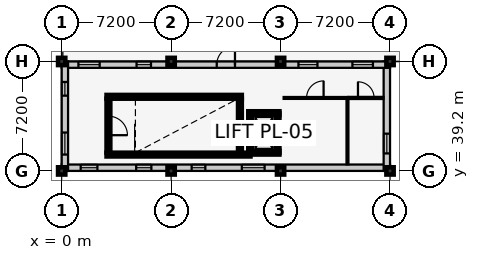
"""IFC4 building model, lengths in metres.
Left out: names, types, materials, properties, quantities, classifications, styles, units other than length and angle.
Written with IfcOpenShell. Run it as: python <this file> out.ifc"""

import sys

from ifc_helpers import new_model, si_unit, direction, frame, frame_2d, origin, origin_2d, place, context, subcontext, project, spatial, rectangle, extrude, element, fill, save


model = new_model("IFC4")
c1 = context("Model", 3, precision=1e-05, world=origin(), true_north=direction((0.0, 1.0)))
c2 = subcontext(c1, "Body", "Model", "MODEL_VIEW")
j1 = project(units=[si_unit("LENGTHUNIT", "METRE"), si_unit("PLANEANGLEUNIT", "RADIAN")], contexts=[c1])
p1 = place(None, origin())
s1 = spatial("IfcSite", under=j1, at=p1, CompositionType="ELEMENT")
p2 = place(p1, origin())
s2 = spatial("IfcBuilding", under=s1, at=p2, CompositionType="ELEMENT")
p3 = place(p2, frame((0.0, 0.0, 18.0)))
s3 = spatial("IfcBuildingStorey", under=s2, at=p3, CompositionType="ELEMENT", Elevation=18.0)
for number, where, z_axis, x_axis in (
    (1, (0.0, 39.2, 0.0), (0.0, 0.0, 1.0), (1.0, 0.0, 0.0)),
    (2, (0.0, 46.4, 0.0), (0.0, 0.0, 1.0), (1.0, 0.0, 0.0)),
    (3, (7.2, 39.2, 0.0), (0.0, 0.0, 1.0), (1.0, 0.0, 0.0)),
    (4, (7.2, 46.4, 0.0), (0.0, 0.0, 1.0), (1.0, 0.0, 0.0)),
    (5, (14.4, 39.2, 0.0), (0.0, 0.0, 1.0), (1.0, 0.0, 0.0)),
    (6, (14.4, 46.4, 0.0), (0.0, 0.0, 1.0), (1.0, 0.0, 0.0)),
    (7, (21.6, 39.2, 0.0), (0.0, 0.0, 1.0), (1.0, 0.0, 0.0)),
    (8, (21.6, 46.4, 0.0), (0.0, 0.0, 1.0), (1.0, 0.0, 0.0)),
):
    element("IfcColumn", number, at=place(p3, frame(where, z_axis=z_axis, x_axis=x_axis)), inside=s3, PredefinedType="COLUMN", context=c2, shape_type="SweptSolid", body=[
        extrude(rectangle(XDim=0.48, YDim=0.48, at=origin_2d()), origin(), (0.0, 0.0, 1.0), 3.9),
    ])
p4 = place(p3, frame((21.6, 39.41, 0.0), z_axis=(0.0, 0.0, 1.0), x_axis=(-1.0, 0.0, 0.0)))
e9 = element("IfcWall", 9, at=p4, inside=s3, PredefinedType="SOLIDWALL", context=c2, shape_type="SweptSolid", body=[
    extrude(rectangle(XDim=21.6, YDim=0.42, at=frame_2d((10.8, 0.0))), origin(), (0.0, 0.0, 1.0), 2.955),
])
p5 = place(p4, frame((8.25, 0.0, 0.9)))
e10 = element("IfcOpeningElement", 10, at=p5, cuts=e9, PredefinedType="OPENING", context=c2, shape_type="SweptSolid", body=[
    extrude(rectangle(XDim=1.5, YDim=1.75, at=frame_2d((0.75, 0.875))), frame((0.0, 0.222, 0.0), z_axis=(0.0, -1.0, 0.0), x_axis=(1.0, 0.0, 0.0)), (0.0, 0.0, 1.0), 0.444),
])
p6 = place(p4, frame((12.15, 0.0, 0.9)))
e11 = element("IfcOpeningElement", 11, at=p6, cuts=e9, PredefinedType="OPENING", context=c2, shape_type="SweptSolid", body=[
    extrude(rectangle(XDim=0.9, YDim=1.35, at=frame_2d((0.45, 0.675))), frame((0.0, 0.222, 0.0), z_axis=(0.0, -1.0, 0.0), x_axis=(1.0, 0.0, 0.0)), (0.0, 0.0, 1.0), 0.444),
])
p7 = place(p4, frame((15.7, 0.0, 0.9)))
e12 = element("IfcOpeningElement", 12, at=p7, cuts=e9, PredefinedType="OPENING", context=c2, shape_type="SweptSolid", body=[
    extrude(rectangle(XDim=1.0, YDim=1.35, at=frame_2d((0.5, 0.675))), frame((0.0, 0.222, 0.0), z_axis=(0.0, -1.0, 0.0), x_axis=(1.0, 0.0, 0.0)), (0.0, 0.0, 1.0), 0.444),
])
p8 = place(p4, frame((19.25, 0.0, 0.9)))
e13 = element("IfcOpeningElement", 13, at=p8, cuts=e9, PredefinedType="OPENING", context=c2, shape_type="SweptSolid", body=[
    extrude(rectangle(XDim=1.1, YDim=1.35, at=frame_2d((0.55, 0.675))), frame((0.0, 0.222, 0.0), z_axis=(0.0, -1.0, 0.0), x_axis=(1.0, 0.0, 0.0)), (0.0, 0.0, 1.0), 0.444),
])
p9 = place(p3, frame((21.39, 46.4, 0.0), z_axis=(0.0, 0.0, 1.0), x_axis=(0.0, -1.0, 0.0)))
e14 = element("IfcWall", 14, at=p9, inside=s3, PredefinedType="SOLIDWALL", context=c2, shape_type="SweptSolid", body=[
    extrude(rectangle(XDim=7.2, YDim=0.42, at=frame_2d((3.6, 0.0))), origin(), (0.0, 0.0, 1.0), 3.055),
])
p10 = place(p9, frame((4.75, 0.0, 0.9)))
e15 = element("IfcOpeningElement", 15, at=p10, cuts=e14, PredefinedType="OPENING", context=c2, shape_type="SweptSolid", body=[
    extrude(rectangle(XDim=1.3, YDim=1.35, at=frame_2d((0.65, 0.675))), frame((0.0, 0.222, 0.0), z_axis=(0.0, -1.0, 0.0), x_axis=(1.0, 0.0, 0.0)), (0.0, 0.0, 1.0), 0.444),
])
p11 = place(p3, frame((0.0, 46.19, 0.0), z_axis=(0.0, 0.0, 1.0), x_axis=(1.0, 0.0, 0.0)))
e16 = element("IfcWall", 16, at=p11, inside=s3, PredefinedType="SOLIDWALL", context=c2, shape_type="SweptSolid", body=[
    extrude(rectangle(XDim=21.6, YDim=0.42, at=frame_2d((10.8, 0.0))), origin(), (0.0, 0.0, 1.0), 2.955),
])
p12 = place(p11, frame((10.2, 0.0, 0.0)))
e17 = element("IfcOpeningElement", 17, at=p12, cuts=e16, PredefinedType="OPENING", context=c2, shape_type="SweptSolid", body=[
    extrude(rectangle(XDim=1.2, YDim=2.15, at=frame_2d((0.6, 1.075))), frame((0.0, 0.222, 0.0), z_axis=(0.0, -1.0, 0.0), x_axis=(1.0, 0.0, 0.0)), (0.0, 0.0, 1.0), 0.444),
])
p13 = place(p11, frame((1.1, 0.0, 0.9)))
e18 = element("IfcOpeningElement", 18, at=p13, cuts=e16, PredefinedType="OPENING", context=c2, shape_type="SweptSolid", body=[
    extrude(rectangle(XDim=1.4, YDim=1.35, at=frame_2d((0.7, 0.675))), frame((0.0, 0.222, 0.0), z_axis=(0.0, -1.0, 0.0), x_axis=(1.0, 0.0, 0.0)), (0.0, 0.0, 1.0), 0.444),
])
p14 = place(p11, frame((4.925, 0.0, 0.9)))
e19 = element("IfcOpeningElement", 19, at=p14, cuts=e16, PredefinedType="OPENING", context=c2, shape_type="SweptSolid", body=[
    extrude(rectangle(XDim=0.95, YDim=1.45, at=frame_2d((0.475, 0.725))), frame((0.0, 0.222, 0.0), z_axis=(0.0, -1.0, 0.0), x_axis=(1.0, 0.0, 0.0)), (0.0, 0.0, 1.0), 0.444),
])
p15 = place(p11, frame((15.575, 0.0, 0.9)))
e20 = element("IfcOpeningElement", 20, at=p15, cuts=e16, PredefinedType="OPENING", context=c2, shape_type="SweptSolid", body=[
    extrude(rectangle(XDim=1.25, YDim=1.45, at=frame_2d((0.625, 0.725))), frame((0.0, 0.222, 0.0), z_axis=(0.0, -1.0, 0.0), x_axis=(1.0, 0.0, 0.0)), (0.0, 0.0, 1.0), 0.444),
])
p16 = place(p11, frame((19.125, 0.0, 0.9)))
e21 = element("IfcOpeningElement", 21, at=p16, cuts=e16, PredefinedType="OPENING", context=c2, shape_type="SweptSolid", body=[
    extrude(rectangle(XDim=1.35, YDim=1.45, at=frame_2d((0.675, 0.725))), frame((0.0, 0.222, 0.0), z_axis=(0.0, -1.0, 0.0), x_axis=(1.0, 0.0, 0.0)), (0.0, 0.0, 1.0), 0.444),
])
p17 = place(p3, frame((0.21, 39.2, 0.0), z_axis=(0.0, 0.0, 1.0), x_axis=(0.0, 1.0, 0.0)))
e22 = element("IfcWall", 22, at=p17, inside=s3, PredefinedType="SOLIDWALL", context=c2, shape_type="SweptSolid", body=[
    extrude(rectangle(XDim=7.2, YDim=0.42, at=frame_2d((3.6, 0.0))), origin(), (0.0, 0.0, 1.0), 3.055),
])
p18 = place(p17, frame((1.075, 0.0, 0.9)))
e23 = element("IfcOpeningElement", 23, at=p18, cuts=e22, PredefinedType="OPENING", context=c2, shape_type="SweptSolid", body=[
    extrude(rectangle(XDim=1.45, YDim=1.45, at=frame_2d((0.725, 0.725))), frame((0.0, 0.222, 0.0), z_axis=(0.0, -1.0, 0.0), x_axis=(1.0, 0.0, 0.0)), (0.0, 0.0, 1.0), 0.444),
])
p19 = place(p17, frame((4.95, 0.0, 0.9)))
e24 = element("IfcOpeningElement", 24, at=p19, cuts=e22, PredefinedType="OPENING", context=c2, shape_type="SweptSolid", body=[
    extrude(rectangle(XDim=0.9, YDim=1.6, at=frame_2d((0.45, 0.8))), frame((0.0, 0.222, 0.0), z_axis=(0.0, -1.0, 0.0), x_axis=(1.0, 0.0, 0.0)), (0.0, 0.0, 1.0), 0.444),
])
p20 = place(p3, frame((2.95, 40.275, 0.0), z_axis=(0.0, 0.0, 1.0), x_axis=(1.0, 0.0, 0.0)))
e25 = element("IfcWall", 25, at=p20, inside=s3, PredefinedType="SHEAR", context=c2, shape_type="SweptSolid", body=[
    extrude(rectangle(XDim=9.47, YDim=0.25, at=frame_2d((4.735, 0.0))), origin(), (0.0, 0.0, 1.0), 3.66),
])
p21 = place(p3, frame((11.85, 44.075, 0.0), z_axis=(0.0, 0.0, 1.0), x_axis=(-1.0, 0.0, 0.0)))
e26 = element("IfcWall", 26, at=p21, inside=s3, PredefinedType="SHEAR", context=c2, shape_type="SweptSolid", body=[
    extrude(rectangle(XDim=8.9, YDim=0.25, at=frame_2d((4.45, 0.0))), origin(), (0.0, 0.0, 1.0), 3.66),
])
p22 = place(p3, frame((3.075, 43.95, 0.0), z_axis=(0.0, 0.0, 1.0), x_axis=(0.0, -1.0, 0.0)))
e27 = element("IfcWall", 27, at=p22, inside=s3, PredefinedType="SHEAR", context=c2, shape_type="SweptSolid", body=[
    extrude(rectangle(XDim=3.55, YDim=0.25, at=frame_2d((1.775, 0.0))), origin(), (0.0, 0.0, 1.0), 3.66),
])
p23 = place(p22, frame((1.15, 0.0, 0.0)))
e28 = element("IfcOpeningElement", 28, at=p23, cuts=e27, PredefinedType="OPENING", context=c2, shape_type="SweptSolid", body=[
    extrude(rectangle(XDim=1.25, YDim=2.15, at=frame_2d((0.625, 1.075))), frame((0.0, 0.137, 0.0), z_axis=(0.0, -1.0, 0.0), x_axis=(1.0, 0.0, 0.0)), (0.0, 0.0, 1.0), 0.274),
])
p24 = place(p3, frame((11.725, 40.4, 0.0), z_axis=(0.0, 0.0, 1.0), x_axis=(0.0, 1.0, 0.0)))
e29 = element("IfcWall", 29, at=p24, inside=s3, PredefinedType="SHEAR", context=c2, shape_type="SweptSolid", body=[
    extrude(rectangle(XDim=3.55, YDim=0.25, at=frame_2d((1.775, 0.0))), origin(), (0.0, 0.0, 1.0), 3.66),
])
p25 = place(p3, frame((12.275, 40.4, 0.0), z_axis=(0.0, 0.0, 1.0), x_axis=(1.0, 0.0, 0.0)))
e30 = element("IfcWall", 30, at=p25, inside=s3, PredefinedType="SHEAR", context=c2, shape_type="SweptSolid", body=[
    extrude(rectangle(XDim=2.05, YDim=0.25, at=frame_2d((1.025, 0.0))), origin(), (0.0, 0.0, 1.0), 3.66),
])
p26 = place(p3, frame((14.325, 43.0, 0.0), z_axis=(0.0, 0.0, 1.0), x_axis=(-1.0, 0.0, 0.0)))
e31 = element("IfcWall", 31, at=p26, inside=s3, PredefinedType="SHEAR", context=c2, shape_type="SweptSolid", body=[
    extrude(rectangle(XDim=2.05, YDim=0.25, at=frame_2d((1.025, 0.0))), origin(), (0.0, 0.0, 1.0), 3.66),
])
p27 = place(p26, frame((0.55, 0.0, 0.0)))
e32 = element("IfcOpeningElement", 32, at=p27, cuts=e31, PredefinedType="OPENING", context=c2, shape_type="SweptSolid", body=[
    extrude(rectangle(XDim=0.95, YDim=2.1, at=frame_2d((0.475, 1.05))), frame((0.0, 0.137, 0.0), z_axis=(0.0, -1.0, 0.0), x_axis=(1.0, 0.0, 0.0)), (0.0, 0.0, 1.0), 0.274),
])
for number, where, z_axis, x_axis in (
    (33, (12.4, 43.0, 0.0), (0.0, 0.0, 1.0), (0.0, -1.0, 0.0)),
    (34, (14.2, 40.4, 0.0), (0.0, 0.0, 1.0), (0.0, 1.0, 0.0)),
):
    element("IfcWall", number, at=place(p3, frame(where, z_axis=z_axis, x_axis=x_axis)), inside=s3, PredefinedType="SHEAR", context=c2, shape_type="SweptSolid", body=[
        extrude(rectangle(XDim=2.6, YDim=0.25, at=frame_2d((1.3, 0.0))), origin(), (0.0, 0.0, 1.0), 3.66),
    ])
p28 = place(p3, frame((14.6, 44.0, 0.0), z_axis=(0.0, 0.0, 1.0), x_axis=(1.0, 0.0, 0.0)))
e35 = element("IfcWall", 35, at=p28, inside=s3, PredefinedType="PARTITIONING", context=c2, shape_type="SweptSolid", body=[
    extrude(rectangle(XDim=4.2, YDim=0.125, at=frame_2d((2.1, 0.0))), origin(), (0.0, 0.0, 1.0), 3.66),
])
p29 = place(p28, frame((1.51, 0.0, 0.0)))
e36 = element("IfcOpeningElement", 36, at=p29, cuts=e35, PredefinedType="OPENING", context=c2, shape_type="SweptSolid", body=[
    extrude(rectangle(XDim=1.12, YDim=2.15, at=frame_2d((0.56, 1.075))), frame((0.0, 0.074, 0.0), z_axis=(0.0, -1.0, 0.0), x_axis=(1.0, 0.0, 0.0)), (0.0, 0.0, 1.0), 0.149),
])
p30 = place(p3, frame((18.8, 39.63, 0.0), z_axis=(0.0, 0.0, 1.0), x_axis=(0.0, 1.0, 0.0)))
e37 = element("IfcWall", 37, at=p30, inside=s3, PredefinedType="PARTITIONING", context=c2, shape_type="SweptSolid", body=[
    extrude(rectangle(XDim=4.298, YDim=0.125, at=frame_2d((2.149, 0.0))), origin(), (0.0, 0.0, 1.0), 3.66),
])
p31 = place(p3, frame((18.873, 44.0, 0.0), z_axis=(0.0, 0.0, 1.0), x_axis=(1.0, 0.0, 0.0)))
e38 = element("IfcWall", 38, at=p31, inside=s3, PredefinedType="PARTITIONING", context=c2, shape_type="SweptSolid", body=[
    extrude(rectangle(XDim=2.297, YDim=0.14, at=frame_2d((1.149, 0.0))), origin(), (0.0, 0.0, 1.0), 3.66),
])
p32 = place(p31, frame((0.619, 0.0, 0.0)))
e39 = element("IfcOpeningElement", 39, at=p32, cuts=e38, PredefinedType="OPENING", context=c2, shape_type="SweptSolid", body=[
    extrude(rectangle(XDim=1.06, YDim=2.1, at=frame_2d((0.53, 1.05))), frame((0.0, 0.082, 0.0), z_axis=(0.0, -1.0, 0.0), x_axis=(1.0, 0.0, 0.0)), (0.0, 0.0, 1.0), 0.164),
])
p33 = place(p5, origin())
e40 = element("IfcWindow", 40, at=p33, inside=s3, PartitioningType="SINGLE_PANEL", PredefinedType="WINDOW", context=c2, shape_type="SweptSolid", body=[
    extrude(rectangle(XDim=1.5, YDim=1.75, at=frame_2d((0.75, 0.875))), frame((0.0, 0.03, 0.0), z_axis=(0.0, -1.0, 0.0), x_axis=(1.0, 0.0, 0.0)), (0.0, 0.0, 1.0), 0.06),
])
fill(e10, e40)
p34 = place(p6, origin())
e41 = element("IfcWindow", 41, at=p34, inside=s3, PartitioningType="SINGLE_PANEL", PredefinedType="WINDOW", context=c2, shape_type="SweptSolid", body=[
    extrude(rectangle(XDim=0.9, YDim=1.35, at=frame_2d((0.45, 0.675))), frame((0.0, 0.03, 0.0), z_axis=(0.0, -1.0, 0.0), x_axis=(1.0, 0.0, 0.0)), (0.0, 0.0, 1.0), 0.06),
])
fill(e11, e41)
p35 = place(p7, origin())
e42 = element("IfcWindow", 42, at=p35, inside=s3, PartitioningType="SINGLE_PANEL", PredefinedType="WINDOW", context=c2, shape_type="SweptSolid", body=[
    extrude(rectangle(XDim=1.0, YDim=1.35, at=frame_2d((0.5, 0.675))), frame((0.0, 0.03, 0.0), z_axis=(0.0, -1.0, 0.0), x_axis=(1.0, 0.0, 0.0)), (0.0, 0.0, 1.0), 0.06),
])
fill(e12, e42)
p36 = place(p8, origin())
e43 = element("IfcWindow", 43, at=p36, inside=s3, PartitioningType="SINGLE_PANEL", PredefinedType="WINDOW", context=c2, shape_type="SweptSolid", body=[
    extrude(rectangle(XDim=1.1, YDim=1.35, at=frame_2d((0.55, 0.675))), frame((0.0, 0.03, 0.0), z_axis=(0.0, -1.0, 0.0), x_axis=(1.0, 0.0, 0.0)), (0.0, 0.0, 1.0), 0.06),
])
fill(e13, e43)
p37 = place(p10, origin())
e44 = element("IfcWindow", 44, at=p37, inside=s3, PartitioningType="SINGLE_PANEL", PredefinedType="WINDOW", context=c2, shape_type="SweptSolid", body=[
    extrude(rectangle(XDim=1.3, YDim=1.35, at=frame_2d((0.65, 0.675))), frame((0.0, 0.03, 0.0), z_axis=(0.0, -1.0, 0.0), x_axis=(1.0, 0.0, 0.0)), (0.0, 0.0, 1.0), 0.06),
])
fill(e15, e44)
p38 = place(p12, origin())
e45 = element("IfcDoor", 45, at=p38, inside=s3, OperationType="SINGLE_SWING_RIGHT", PredefinedType="DOOR", context=c2, shape_type="SweptSolid", body=[
    extrude(rectangle(XDim=1.2, YDim=2.15, at=frame_2d((0.6, 1.075))), frame((0.0, 0.025, 0.0), z_axis=(0.0, -1.0, 0.0), x_axis=(1.0, 0.0, 0.0)), (0.0, 0.0, 1.0), 0.05),
])
fill(e17, e45)
p39 = place(p13, origin())
e46 = element("IfcWindow", 46, at=p39, inside=s3, PartitioningType="SINGLE_PANEL", PredefinedType="WINDOW", context=c2, shape_type="SweptSolid", body=[
    extrude(rectangle(XDim=1.4, YDim=1.35, at=frame_2d((0.7, 0.675))), frame((0.0, 0.03, 0.0), z_axis=(0.0, -1.0, 0.0), x_axis=(1.0, 0.0, 0.0)), (0.0, 0.0, 1.0), 0.06),
])
fill(e18, e46)
p40 = place(p14, origin())
e47 = element("IfcWindow", 47, at=p40, inside=s3, PartitioningType="SINGLE_PANEL", PredefinedType="WINDOW", context=c2, shape_type="SweptSolid", body=[
    extrude(rectangle(XDim=0.95, YDim=1.45, at=frame_2d((0.475, 0.725))), frame((0.0, 0.03, 0.0), z_axis=(0.0, -1.0, 0.0), x_axis=(1.0, 0.0, 0.0)), (0.0, 0.0, 1.0), 0.06),
])
fill(e19, e47)
p41 = place(p15, origin())
e48 = element("IfcWindow", 48, at=p41, inside=s3, PartitioningType="SINGLE_PANEL", PredefinedType="WINDOW", context=c2, shape_type="SweptSolid", body=[
    extrude(rectangle(XDim=1.25, YDim=1.45, at=frame_2d((0.625, 0.725))), frame((0.0, 0.03, 0.0), z_axis=(0.0, -1.0, 0.0), x_axis=(1.0, 0.0, 0.0)), (0.0, 0.0, 1.0), 0.06),
])
fill(e20, e48)
p42 = place(p16, origin())
e49 = element("IfcWindow", 49, at=p42, inside=s3, PartitioningType="SINGLE_PANEL", PredefinedType="WINDOW", context=c2, shape_type="SweptSolid", body=[
    extrude(rectangle(XDim=1.35, YDim=1.45, at=frame_2d((0.675, 0.725))), frame((0.0, 0.03, 0.0), z_axis=(0.0, -1.0, 0.0), x_axis=(1.0, 0.0, 0.0)), (0.0, 0.0, 1.0), 0.06),
])
fill(e21, e49)
p43 = place(p18, origin())
e50 = element("IfcWindow", 50, at=p43, inside=s3, PartitioningType="SINGLE_PANEL", PredefinedType="WINDOW", context=c2, shape_type="SweptSolid", body=[
    extrude(rectangle(XDim=1.45, YDim=1.45, at=frame_2d((0.725, 0.725))), frame((0.0, 0.03, 0.0), z_axis=(0.0, -1.0, 0.0), x_axis=(1.0, 0.0, 0.0)), (0.0, 0.0, 1.0), 0.06),
])
fill(e23, e50)
p44 = place(p19, origin())
e51 = element("IfcWindow", 51, at=p44, inside=s3, PartitioningType="SINGLE_PANEL", PredefinedType="WINDOW", context=c2, shape_type="SweptSolid", body=[
    extrude(rectangle(XDim=0.9, YDim=1.6, at=frame_2d((0.45, 0.8))), frame((0.0, 0.03, 0.0), z_axis=(0.0, -1.0, 0.0), x_axis=(1.0, 0.0, 0.0)), (0.0, 0.0, 1.0), 0.06),
])
fill(e24, e51)
p45 = place(p23, origin())
e52 = element("IfcDoor", 52, at=p45, inside=s3, OperationType="SINGLE_SWING_RIGHT", PredefinedType="DOOR", context=c2, shape_type="SweptSolid", body=[
    extrude(rectangle(XDim=1.25, YDim=2.15, at=frame_2d((0.625, 1.075))), frame((0.0, 0.025, 0.0), z_axis=(0.0, -1.0, 0.0), x_axis=(1.0, 0.0, 0.0)), (0.0, 0.0, 1.0), 0.05),
])
fill(e28, e52)
p46 = place(p27, origin())
e53 = element("IfcDoor", 53, at=p46, inside=s3, OperationType="SLIDING_TO_LEFT", PredefinedType="DOOR", context=c2, shape_type="SweptSolid", body=[
    extrude(rectangle(XDim=0.95, YDim=2.1, at=frame_2d((0.475, 1.05))), frame((0.0, 0.025, 0.0), z_axis=(0.0, -1.0, 0.0), x_axis=(1.0, 0.0, 0.0)), (0.0, 0.0, 1.0), 0.05),
])
fill(e32, e53)
p47 = place(p29, origin())
e54 = element("IfcDoor", 54, at=p47, inside=s3, OperationType="SINGLE_SWING_RIGHT", PredefinedType="DOOR", context=c2, shape_type="SweptSolid", body=[
    extrude(rectangle(XDim=1.12, YDim=2.15, at=frame_2d((0.56, 1.075))), frame((0.0, 0.025, 0.0), z_axis=(0.0, -1.0, 0.0), x_axis=(1.0, 0.0, 0.0)), (0.0, 0.0, 1.0), 0.05),
])
fill(e36, e54)
p48 = place(p32, origin())
e55 = element("IfcDoor", 55, at=p48, inside=s3, OperationType="SINGLE_SWING_LEFT", PredefinedType="DOOR", context=c2, shape_type="SweptSolid", body=[
    extrude(rectangle(XDim=1.06, YDim=2.1, at=frame_2d((0.53, 1.05))), frame((0.0, 0.025, 0.0), z_axis=(0.0, -1.0, 0.0), x_axis=(1.0, 0.0, 0.0)), (0.0, 0.0, 1.0), 0.05),
])
fill(e39, e55)
save(model, sys.argv[1])
